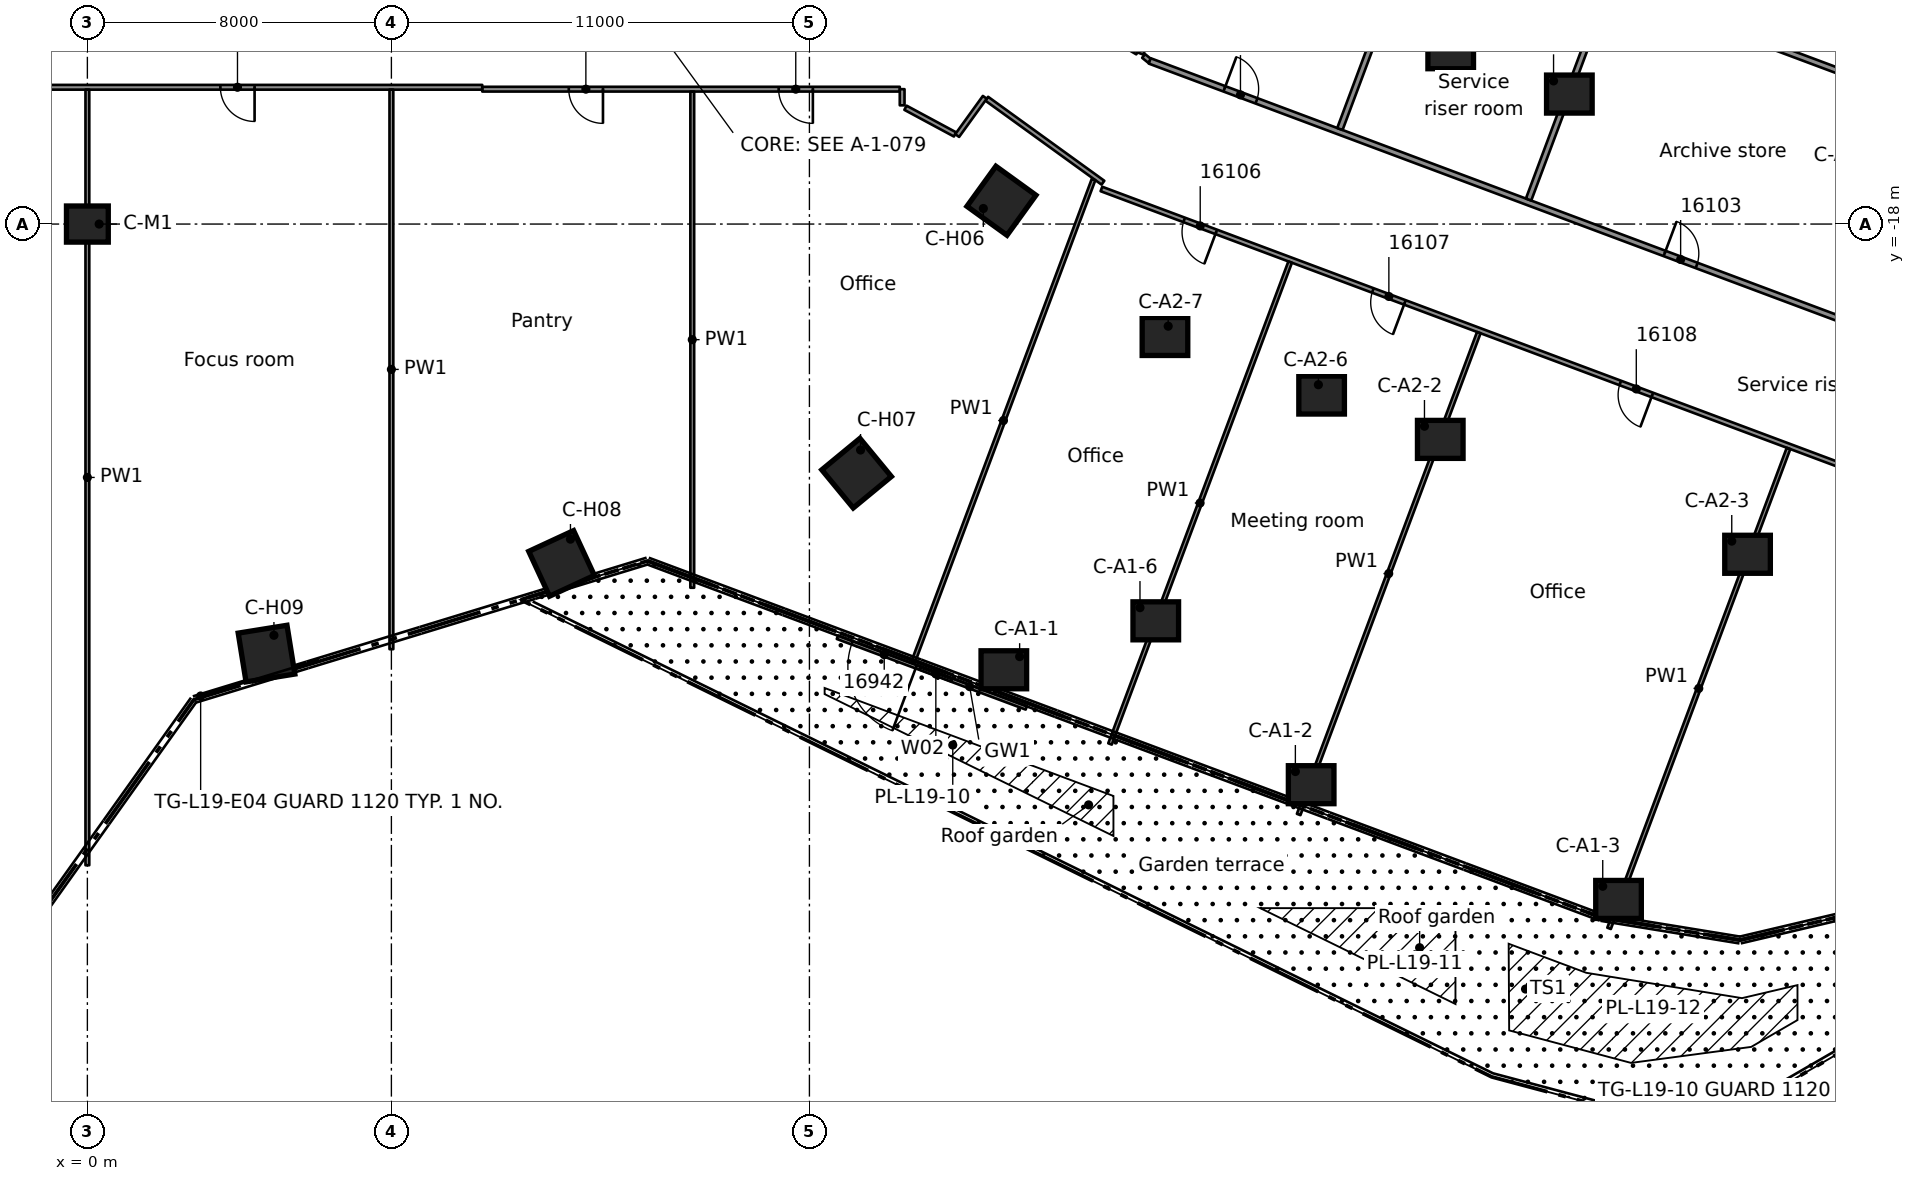
"""IFC4 building model, lengths in metres.
Left out: names, types, materials, properties, quantities, classifications, styles, units other than length and angle.
Written with IfcOpenShell. Run it as: python <this file> out.ifc"""

import sys

from ifc_helpers import new_model, si_unit, direction, frame, frame_2d, origin, origin_2d, place, context, subcontext, project, spatial, rectangle, extrude, element, fill, save


model = new_model("IFC4")
c1 = context("Model", 3, precision=1e-05, world=origin(), true_north=direction((0.0, 1.0)))
c2 = subcontext(c1, "Body", "Model", "MODEL_VIEW")
j1 = project(units=[si_unit("LENGTHUNIT", "METRE"), si_unit("PLANEANGLEUNIT", "RADIAN")], contexts=[c1])
p1 = place(None, origin())
s1 = spatial("IfcSite", under=j1, at=p1, CompositionType="ELEMENT")
p2 = place(p1, origin())
s2 = spatial("IfcBuilding", under=s1, at=p2, CompositionType="ELEMENT")
p3 = place(p2, frame((0.0, 0.0, 80.7)))
s3 = spatial("IfcBuildingStorey", under=s2, at=p3, CompositionType="ELEMENT", Elevation=80.7)
for number, where, z_axis, x_axis in (
    (1, (24.116, -29.728, 0.0), (0.0, 0.0, 1.0), (1.0, 0.0, 0.0)),
    (2, (32.203, -32.752, 0.0), (0.0, 0.0, 1.0), (1.0, 0.0, 0.0)),
    (3, (40.291, -35.771, 0.0), (0.0, 0.0, 1.0), (1.0, 0.0, 0.0)),
    (4, (28.114, -28.44, 0.0), (0.0, 0.0, 1.0), (1.0, 0.0, 0.0)),
    (5, (35.6, -23.666, 0.0), (0.0, 0.0, 1.0), (1.0, 0.0, 0.0)),
    (6, (43.686, -26.689, 0.0), (0.0, 0.0, 1.0), (1.0, 0.0, 0.0)),
    (7, (32.478, -22.499, 0.0), (0.0, 0.0, 1.0), (1.0, 0.0, 0.0)),
    (8, (28.356, -20.958, 0.0), (0.0, 0.0, 1.0), (1.0, 0.0, 0.0)),
    (9, (38.997, -14.58, 0.0), (0.0, 0.0, 1.0), (1.0, 0.0, 0.0)),
    (10, (35.875, -13.413, 0.0), (0.0, 0.0, 1.0), (1.0, 0.0, 0.0)),
):
    element("IfcColumn", number, at=place(p3, frame(where, z_axis=z_axis, x_axis=x_axis)), inside=s3, PredefinedType="COLUMN", context=c2, shape_type="SweptSolid", body=[
        extrude(rectangle(XDim=1.2, YDim=1.0, at=origin_2d()), origin(), (0.0, 0.0, 1.0), 3.5),
    ])
for number, where, z_axis, x_axis in (
    (11, (24.053, -17.387, 0.0), (0.0, 0.0, 1.0), (0.81, -0.586, 0.0)),
    (12, (20.241, -24.555, 0.0), (0.0, 0.0, 1.0), (0.636, -0.772, 0.0)),
    (13, (12.478, -26.929, 0.0), (0.0, 0.0, 1.0), (0.42, -0.907, 0.0)),
    (14, (4.714, -29.302, 0.0), (0.0, 0.0, 1.0), (0.159, -0.987, 0.0)),
):
    element("IfcColumn", number, at=place(p3, frame(where, z_axis=z_axis, x_axis=x_axis)), inside=s3, PredefinedType="COLUMN", context=c2, shape_type="SweptSolid", body=[
        extrude(rectangle(XDim=1.3, YDim=1.3, at=origin_2d()), origin(), (0.0, 0.0, 1.0), 3.5),
    ])
p4 = place(p3, frame((0.0, -18.0, 0.0), z_axis=(0.0, 0.0, 1.0), x_axis=(1.0, 0.0, 0.0)))
e15 = element("IfcColumn", 15, at=p4, inside=s3, PredefinedType="COLUMN", context=c2, shape_type="SweptSolid", body=[
    extrude(rectangle(XDim=1.1, YDim=0.95, at=origin_2d()), origin(), (0.0, 0.0, 1.0), 3.5),
])
p5 = place(p3, frame((24.708, -30.729, 0.0), z_axis=(0.0, 0.0, 1.0), x_axis=(-0.93667095457, 0.35021068354, 0.0)))
e16 = element("IfcWall", 16, at=p5, inside=s3, PredefinedType="STANDARD", context=c2, shape_type="SweptSolid", body=[
    extrude(rectangle(XDim=5.306, YDim=0.1, at=frame_2d((2.653, 0.0))), origin(), (0.0, 0.0, 1.0), 3.1),
])
p6 = place(p5, frame((3.092, 0.0, 0.0)))
e17 = element("IfcOpeningElement", 17, at=p6, cuts=e16, PredefinedType="OPENING", context=c2, shape_type="SweptSolid", body=[
    extrude(rectangle(XDim=1.8, YDim=2.4, at=frame_2d((0.9, 1.2))), frame((0.0, 0.06, 0.0), z_axis=(0.0, -1.0, 0.0), x_axis=(1.0, 0.0, 0.0)), (0.0, 0.0, 1.0), 0.12),
])
p7 = place(p5, frame((2.092, 0.0, 0.0)))
e18 = element("IfcOpeningElement", 18, at=p7, cuts=e16, PredefinedType="OPENING", context=c2, shape_type="SweptSolid", body=[
    extrude(rectangle(XDim=0.9, YDim=2.4, at=frame_2d((0.45, 1.2))), frame((0.0, 0.06, 0.0), z_axis=(0.0, -1.0, 0.0), x_axis=(1.0, 0.0, 0.0)), (0.0, 0.0, 1.0), 0.12),
])
p8 = place(p3, frame((27.794, -13.578, 0.0), z_axis=(0.0, 0.0, 1.0), x_axis=(0.778431743949, -0.627729256935, 0.0)))
e19 = element("IfcWall", 19, at=p8, inside=s3, PredefinedType="PARTITIONING", context=c2, shape_type="SweptSolid", body=[
    extrude(rectangle(XDim=0.206, YDim=0.125, at=frame_2d((0.103, 0.0))), origin(), (0.0, 0.0, 1.0), 3.08),
])
p9 = place(p3, frame((27.639, -13.47, 0.0), z_axis=(0.0, 0.0, 1.0), x_axis=(-0.862037468795, 0.506844554468, 0.0)))
e20 = element("IfcWall", 20, at=p9, inside=s3, PredefinedType="PARTITIONING", context=c2, shape_type="SweptSolid", body=[
    extrude(rectangle(XDim=2.188, YDim=0.15, at=frame_2d((1.094, 0.0))), origin(), (0.0, 0.0, 1.0), 3.08),
])
p10 = place(p3, frame((23.666, -14.702, 0.0), z_axis=(0.0, 0.0, 1.0), x_axis=(0.810481264218, -0.585764560512, 0.0)))
e21 = element("IfcWall", 21, at=p10, inside=s3, PredefinedType="PARTITIONING", context=c2, shape_type="SweptSolid", body=[
    extrude(rectangle(XDim=3.773, YDim=0.125, at=frame_2d((1.887, 0.0))), origin(), (0.0, 0.0, 1.0), 3.08),
])
p11 = place(p3, frame((21.528, -14.94, 0.0), z_axis=(0.0, 0.0, 1.0), x_axis=(0.880465806507, -0.474109653532, 0.0)))
e22 = element("IfcWall", 22, at=p11, inside=s3, PredefinedType="PARTITIONING", context=c2, shape_type="SweptSolid", body=[
    extrude(rectangle(XDim=1.481, YDim=0.125, at=frame_2d((0.74, 0.0))), origin(), (0.0, 0.0, 1.0), 3.08),
])
p12 = place(p3, frame((49.879, -25.749, 0.0), z_axis=(0.0, 0.0, 1.0), x_axis=(-0.936673120203, 0.350204891299, 0.0)))
e23 = element("IfcWall", 23, at=p12, inside=s3, PredefinedType="PARTITIONING", context=c2, shape_type="SweptSolid", body=[
    extrude(rectangle(XDim=24.763, YDim=0.125, at=frame_2d((12.381, 0.0))), origin(), (0.0, 0.0, 1.0), 3.08),
])
p13 = place(p12, frame((21.538, 0.0, 0.0)))
e24 = element("IfcOpeningElement", 24, at=p13, cuts=e23, PredefinedType="OPENING", context=c2, shape_type="SweptSolid", body=[
    extrude(rectangle(XDim=0.9, YDim=2.1, at=frame_2d((0.45, 1.05))), frame((0.0, 0.073, 0.0), z_axis=(0.0, -1.0, 0.0), x_axis=(1.0, 0.0, 0.0)), (0.0, 0.0, 1.0), 0.145),
])
p14 = place(p12, frame((16.238, 0.0, 0.0)))
e25 = element("IfcOpeningElement", 25, at=p14, cuts=e23, PredefinedType="OPENING", context=c2, shape_type="SweptSolid", body=[
    extrude(rectangle(XDim=0.9, YDim=2.1, at=frame_2d((0.45, 1.05))), frame((0.0, 0.073, 0.0), z_axis=(0.0, -1.0, 0.0), x_axis=(1.0, 0.0, 0.0)), (0.0, 0.0, 1.0), 0.145),
])
p15 = place(p12, frame((9.287, 0.0, 0.0)))
e26 = element("IfcOpeningElement", 26, at=p15, cuts=e23, PredefinedType="OPENING", context=c2, shape_type="SweptSolid", body=[
    extrude(rectangle(XDim=0.9, YDim=2.1, at=frame_2d((0.45, 1.05))), frame((0.0, 0.073, 0.0), z_axis=(0.0, -1.0, 0.0), x_axis=(1.0, 0.0, 0.0)), (0.0, 0.0, 1.0), 0.145),
])
p16 = place(p3, frame((27.954, -13.707, 0.0), z_axis=(0.0, 0.0, 1.0), x_axis=(0.936643936966, -0.350282936133, 0.0)))
e27 = element("IfcWall", 27, at=p16, inside=s3, PredefinedType="PARTITIONING", context=c2, shape_type="SweptSolid", body=[
    extrude(rectangle(XDim=21.14, YDim=0.15, at=frame_2d((10.57, 0.0))), origin(), (0.0, 0.0, 1.0), 3.08),
])
p17 = place(p16, frame((2.1, 0.0, 0.0)))
e28 = element("IfcOpeningElement", 28, at=p17, cuts=e27, PredefinedType="OPENING", context=c2, shape_type="SweptSolid", body=[
    extrude(rectangle(XDim=0.9, YDim=2.1, at=frame_2d((0.45, 1.05))), frame((0.0, 0.085, 0.0), z_axis=(0.0, -1.0, 0.0), x_axis=(1.0, 0.0, 0.0)), (0.0, 0.0, 1.0), 0.17),
])
p18 = place(p16, frame((14.466, 0.0, 0.0)))
e29 = element("IfcOpeningElement", 29, at=p18, cuts=e27, PredefinedType="OPENING", context=c2, shape_type="SweptSolid", body=[
    extrude(rectangle(XDim=0.9, YDim=2.1, at=frame_2d((0.45, 1.05))), frame((0.0, 0.085, 0.0), z_axis=(0.0, -1.0, 0.0), x_axis=(1.0, 0.0, 0.0)), (0.0, 0.0, 1.0), 0.17),
])
p19 = place(p3, frame((49.892, -15.397, 0.0), z_axis=(0.0, 0.0, 1.0), x_axis=(-0.936700392394, 0.35013193926, 0.0)))
e30 = element("IfcWall", 30, at=p19, inside=s3, PredefinedType="PARTITIONING", context=c2, shape_type="SweptSolid", body=[
    extrude(rectangle(XDim=21.106, YDim=0.15, at=frame_2d((10.553, 0.0))), origin(), (0.0, 0.0, 1.0), 3.08),
])
p20 = place(p19, frame((12.624, 0.0, 0.0)))
e31 = element("IfcOpeningElement", 31, at=p20, cuts=e30, PredefinedType="OPENING", context=c2, shape_type="SweptSolid", body=[
    extrude(rectangle(XDim=0.9, YDim=2.1, at=frame_2d((0.45, 1.05))), frame((0.0, 0.085, 0.0), z_axis=(0.0, -1.0, 0.0), x_axis=(1.0, 0.0, 0.0)), (0.0, 0.0, 1.0), 0.17),
])
p21 = place(p19, frame((0.525, 0.0, 0.0)))
e32 = element("IfcOpeningElement", 32, at=p21, cuts=e30, PredefinedType="OPENING", context=c2, shape_type="SweptSolid", body=[
    extrude(rectangle(XDim=0.9, YDim=2.1, at=frame_2d((0.45, 1.05))), frame((0.0, 0.085, 0.0), z_axis=(0.0, -1.0, 0.0), x_axis=(1.0, 0.0, 0.0)), (0.0, 0.0, 1.0), 0.17),
])
p22 = place(p3, frame((21.378, -14.451, 0.0), z_axis=(0.0, 0.0, 1.0), x_axis=(-1.0, 0.0, 0.0)))
e33 = element("IfcWall", 33, at=p22, inside=s3, PredefinedType="PARTITIONING", context=c2, shape_type="SweptSolid", body=[
    extrude(rectangle(XDim=10.987, YDim=0.125, at=frame_2d((5.493, 0.0))), origin(), (0.0, 0.0, 1.0), 3.08),
])
p23 = place(p22, frame((7.811, 0.0, 0.0)))
e34 = element("IfcOpeningElement", 34, at=p23, cuts=e33, PredefinedType="OPENING", context=c2, shape_type="SweptSolid", body=[
    extrude(rectangle(XDim=0.9, YDim=2.1, at=frame_2d((0.45, 1.05))), frame((0.0, 0.073, 0.0), z_axis=(0.0, -1.0, 0.0), x_axis=(1.0, 0.0, 0.0)), (0.0, 0.0, 1.0), 0.145),
])
p24 = place(p22, frame((2.288, 0.0, 0.0)))
e35 = element("IfcOpeningElement", 35, at=p24, cuts=e33, PredefinedType="OPENING", context=c2, shape_type="SweptSolid", body=[
    extrude(rectangle(XDim=0.9, YDim=2.1, at=frame_2d((0.45, 1.05))), frame((0.0, 0.073, 0.0), z_axis=(0.0, -1.0, 0.0), x_axis=(1.0, 0.0, 0.0)), (0.0, 0.0, 1.0), 0.145),
])
p25 = place(p3, frame((10.391, -14.401, 0.0), z_axis=(0.0, 0.0, 1.0), x_axis=(-1.0, 0.0, 0.0)))
e36 = element("IfcWall", 36, at=p25, inside=s3, PredefinedType="PARTITIONING", context=c2, shape_type="SweptSolid", body=[
    extrude(rectangle(XDim=20.781, YDim=0.125, at=frame_2d((10.391, 0.0))), origin(), (0.0, 0.0, 1.0), 3.08),
])
p26 = place(p25, frame((13.491, 0.0, 0.0)))
e37 = element("IfcOpeningElement", 37, at=p26, cuts=e36, PredefinedType="OPENING", context=c2, shape_type="SweptSolid", body=[
    extrude(rectangle(XDim=1.8, YDim=2.1, at=frame_2d((0.9, 1.05))), frame((0.0, 0.073, 0.0), z_axis=(0.0, -1.0, 0.0), x_axis=(1.0, 0.0, 0.0)), (0.0, 0.0, 1.0), 0.145),
])
p27 = place(p25, frame((5.991, 0.0, 0.0)))
e38 = element("IfcOpeningElement", 38, at=p27, cuts=e36, PredefinedType="OPENING", context=c2, shape_type="SweptSolid", body=[
    extrude(rectangle(XDim=0.9, YDim=2.1, at=frame_2d((0.45, 1.05))), frame((0.0, 0.073, 0.0), z_axis=(0.0, -1.0, 0.0), x_axis=(1.0, 0.0, 0.0)), (0.0, 0.0, 1.0), 0.145),
])
p28 = place(p3, frame((22.888, -15.671, 0.0), z_axis=(0.0, 0.0, 1.0), x_axis=(0.585806524415, 0.810450933711, 0.0)))
e39 = element("IfcWall", 39, at=p28, inside=s3, PredefinedType="PARTITIONING", context=c2, shape_type="SweptSolid", body=[
    extrude(rectangle(XDim=1.241, YDim=0.125, at=frame_2d((0.621, 0.0))), origin(), (0.0, 0.0, 1.0), 3.08),
])
p29 = place(p3, frame((40.042, -36.532, 0.0), z_axis=(0.0, 0.0, 1.0), x_axis=(0.350242156922, 0.936659186425, 0.0)))
e40 = element("IfcWall", 40, at=p29, inside=s3, PredefinedType="PARTITIONING", context=c2, shape_type="SweptSolid", body=[
    extrude(rectangle(XDim=13.482, YDim=0.1, at=frame_2d((6.741, 0.0))), origin(), (0.0, 0.0, 1.0), 3.08),
])
p30 = place(p3, frame((31.874, -33.536, 0.0), z_axis=(0.0, 0.0, 1.0), x_axis=(0.350176475244, 0.936683743953, 0.0)))
e41 = element("IfcWall", 41, at=p30, inside=s3, PredefinedType="PARTITIONING", context=c2, shape_type="SweptSolid", body=[
    extrude(rectangle(XDim=13.536, YDim=0.1, at=frame_2d((6.768, 0.0))), origin(), (0.0, 0.0, 1.0), 3.08),
])
p31 = place(p3, frame((37.924, -17.355, 0.0), z_axis=(0.0, 0.0, 1.0), x_axis=(0.350255420324, 0.936654226774, 0.0)))
e42 = element("IfcWall", 42, at=p31, inside=s3, PredefinedType="PARTITIONING", context=c2, shape_type="SweptSolid", body=[
    extrude(rectangle(XDim=5.95, YDim=0.15, at=frame_2d((2.975, 0.0))), origin(), (0.0, 0.0, 1.0), 3.08),
])
p32 = place(p3, frame((26.91, -31.68, 0.0), z_axis=(0.0, 0.0, 1.0), x_axis=(0.350176475244, 0.936683743953, 0.0)))
e43 = element("IfcWall", 43, at=p32, inside=s3, PredefinedType="PARTITIONING", context=c2, shape_type="SweptSolid", body=[
    extrude(rectangle(XDim=13.536, YDim=0.1, at=frame_2d((6.768, 0.0))), origin(), (0.0, 0.0, 1.0), 3.08),
])
p33 = place(p3, frame((32.959, -15.499, 0.0), z_axis=(0.0, 0.0, 1.0), x_axis=(0.350255420324, 0.936654226774, 0.0)))
e44 = element("IfcWall", 44, at=p33, inside=s3, PredefinedType="PARTITIONING", context=c2, shape_type="SweptSolid", body=[
    extrude(rectangle(XDim=5.95, YDim=0.15, at=frame_2d((2.975, 0.0))), origin(), (0.0, 0.0, 1.0), 3.08),
])
p34 = place(p3, frame((21.735, -29.511, 0.0), z_axis=(0.0, 0.0, 1.0), x_axis=(0.350202491623, 0.936674017394, 0.0)))
e45 = element("IfcWall", 45, at=p34, inside=s3, PredefinedType="PARTITIONING", context=c2, shape_type="SweptSolid", body=[
    extrude(rectangle(XDim=13.541, YDim=0.1, at=frame_2d((6.77, 0.0))), origin(), (0.0, 0.0, 1.0), 3.08),
])
p35 = place(p3, frame((27.716, -13.515, 0.0), z_axis=(0.0, 0.0, 1.0), x_axis=(0.350096695155, 0.936713565633, 0.0)))
e46 = element("IfcWall", 46, at=p35, inside=s3, PredefinedType="PARTITIONING", context=c2, shape_type="SweptSolid", body=[
    extrude(rectangle(XDim=5.213, YDim=0.15, at=frame_2d((2.606, 0.0))), origin(), (0.0, 0.0, 1.0), 3.08),
])
p36 = place(p3, frame((21.44, -14.876, 0.0), z_axis=(0.0, 0.0, 1.0), x_axis=(0.0, 1.0, 0.0)))
e47 = element("IfcWall", 47, at=p36, inside=s3, PredefinedType="PARTITIONING", context=c2, shape_type="SweptSolid", body=[
    extrude(rectangle(XDim=0.425, YDim=0.125, at=frame_2d((0.212, 0.0))), origin(), (0.0, 0.0, 1.0), 3.08),
])
p37 = place(p3, frame((15.917, -27.57, 0.0), z_axis=(0.0, 0.0, 1.0), x_axis=(0.0, 1.0, 0.0)))
e48 = element("IfcWall", 48, at=p37, inside=s3, PredefinedType="PARTITIONING", context=c2, shape_type="SweptSolid", body=[
    extrude(rectangle(XDim=13.056, YDim=0.1, at=frame_2d((6.528, 0.0))), origin(), (0.0, 0.0, 1.0), 3.08),
])
p38 = place(p3, frame((8.0, -29.186, 0.0), z_axis=(0.0, 0.0, 1.0), x_axis=(0.0, 1.0, 0.0)))
e49 = element("IfcWall", 49, at=p38, inside=s3, PredefinedType="PARTITIONING", context=c2, shape_type="SweptSolid", body=[
    extrude(rectangle(XDim=14.723, YDim=0.1, at=frame_2d((7.362, 0.0))), origin(), (0.0, 0.0, 1.0), 3.08),
])
p39 = place(p3, frame((0.0, -34.871, 0.0), z_axis=(0.0, 0.0, 1.0), x_axis=(0.0, 1.0, 0.0)))
e50 = element("IfcWall", 50, at=p39, inside=s3, PredefinedType="PARTITIONING", context=c2, shape_type="SweptSolid", body=[
    extrude(rectangle(XDim=20.408, YDim=0.1, at=frame_2d((10.204, 0.0))), origin(), (0.0, 0.0, 1.0), 3.08),
])
p40 = place(p6, origin())
e51 = element("IfcDoor", 51, at=p40, inside=s3, OperationType="DOUBLE_DOOR_SINGLE_SWING", PredefinedType="DOOR", context=c2, shape_type="SweptSolid", body=[
    extrude(rectangle(XDim=1.8, YDim=2.4, at=frame_2d((0.9, 1.2))), frame((0.0, 0.025, 0.0), z_axis=(0.0, -1.0, 0.0), x_axis=(1.0, 0.0, 0.0)), (0.0, 0.0, 1.0), 0.05),
])
fill(e17, e51)
p41 = place(p7, origin())
e52 = element("IfcWindow", 52, at=p41, inside=s3, PartitioningType="SINGLE_PANEL", PredefinedType="WINDOW", context=c2, shape_type="SweptSolid", body=[
    extrude(rectangle(XDim=0.9, YDim=2.4, at=frame_2d((0.45, 1.2))), frame((0.0, 0.03, 0.0), z_axis=(0.0, -1.0, 0.0), x_axis=(1.0, 0.0, 0.0)), (0.0, 0.0, 1.0), 0.06),
])
fill(e18, e52)
p42 = place(p17, origin())
e53 = element("IfcDoor", 53, at=p42, inside=s3, OperationType="SINGLE_SWING_LEFT", PredefinedType="DOOR", context=c2, shape_type="SweptSolid", body=[
    extrude(rectangle(XDim=0.9, YDim=2.1, at=frame_2d((0.45, 1.05))), frame((0.0, 0.025, 0.0), z_axis=(0.0, -1.0, 0.0), x_axis=(1.0, 0.0, 0.0)), (0.0, 0.0, 1.0), 0.05),
])
fill(e28, e53)
p43 = place(p18, origin())
e54 = element("IfcDoor", 54, at=p43, inside=s3, OperationType="SINGLE_SWING_RIGHT", PredefinedType="DOOR", context=c2, shape_type="SweptSolid", body=[
    extrude(rectangle(XDim=0.9, YDim=2.1, at=frame_2d((0.45, 1.05))), frame((0.0, 0.025, 0.0), z_axis=(0.0, -1.0, 0.0), x_axis=(1.0, 0.0, 0.0)), (0.0, 0.0, 1.0), 0.05),
])
fill(e29, e54)
p44 = place(p13, origin())
e55 = element("IfcDoor", 55, at=p44, inside=s3, OperationType="SINGLE_SWING_RIGHT", PredefinedType="DOOR", context=c2, shape_type="SweptSolid", body=[
    extrude(rectangle(XDim=0.9, YDim=2.1, at=frame_2d((0.45, 1.05))), frame((0.0, 0.025, 0.0), z_axis=(0.0, -1.0, 0.0), x_axis=(1.0, 0.0, 0.0)), (0.0, 0.0, 1.0), 0.05),
])
fill(e24, e55)
p45 = place(p14, origin())
e56 = element("IfcDoor", 56, at=p45, inside=s3, OperationType="SINGLE_SWING_RIGHT", PredefinedType="DOOR", context=c2, shape_type="SweptSolid", body=[
    extrude(rectangle(XDim=0.9, YDim=2.1, at=frame_2d((0.45, 1.05))), frame((0.0, 0.025, 0.0), z_axis=(0.0, -1.0, 0.0), x_axis=(1.0, 0.0, 0.0)), (0.0, 0.0, 1.0), 0.05),
])
fill(e25, e56)
p46 = place(p15, origin())
e57 = element("IfcDoor", 57, at=p46, inside=s3, OperationType="SINGLE_SWING_LEFT", PredefinedType="DOOR", context=c2, shape_type="SweptSolid", body=[
    extrude(rectangle(XDim=0.9, YDim=2.1, at=frame_2d((0.45, 1.05))), frame((0.0, 0.025, 0.0), z_axis=(0.0, -1.0, 0.0), x_axis=(1.0, 0.0, 0.0)), (0.0, 0.0, 1.0), 0.05),
])
fill(e26, e57)
p47 = place(p27, origin())
e58 = element("IfcDoor", 58, at=p47, inside=s3, OperationType="SINGLE_SWING_LEFT", PredefinedType="DOOR", context=c2, shape_type="SweptSolid", body=[
    extrude(rectangle(XDim=0.9, YDim=2.1, at=frame_2d((0.45, 1.05))), frame((0.0, 0.025, 0.0), z_axis=(0.0, -1.0, 0.0), x_axis=(1.0, 0.0, 0.0)), (0.0, 0.0, 1.0), 0.05),
])
fill(e38, e58)
p48 = place(p23, origin())
e59 = element("IfcDoor", 59, at=p48, inside=s3, OperationType="SINGLE_SWING_RIGHT", PredefinedType="DOOR", context=c2, shape_type="SweptSolid", body=[
    extrude(rectangle(XDim=0.9, YDim=2.1, at=frame_2d((0.45, 1.05))), frame((0.0, 0.025, 0.0), z_axis=(0.0, -1.0, 0.0), x_axis=(1.0, 0.0, 0.0)), (0.0, 0.0, 1.0), 0.05),
])
fill(e34, e59)
p49 = place(p24, origin())
e60 = element("IfcDoor", 60, at=p49, inside=s3, OperationType="SINGLE_SWING_LEFT", PredefinedType="DOOR", context=c2, shape_type="SweptSolid", body=[
    extrude(rectangle(XDim=0.9, YDim=2.1, at=frame_2d((0.45, 1.05))), frame((0.0, 0.025, 0.0), z_axis=(0.0, -1.0, 0.0), x_axis=(1.0, 0.0, 0.0)), (0.0, 0.0, 1.0), 0.05),
])
fill(e35, e60)
save(model, sys.argv[1])
